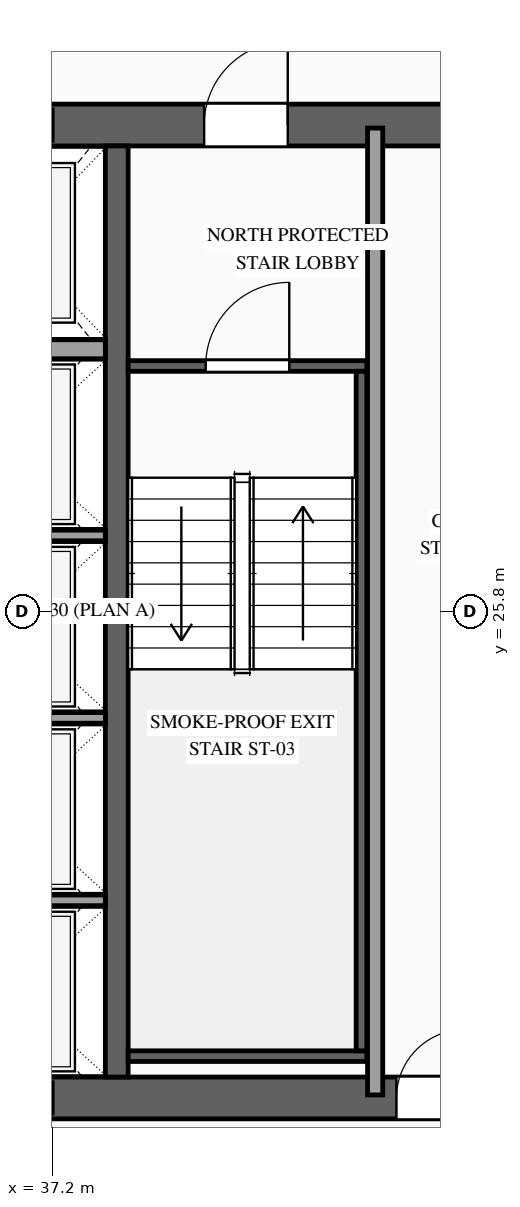
"""IFC4 building model, lengths in metres.
Left out: names, types, materials, properties, quantities, classifications, styles, units other than length and angle.
Written with IfcOpenShell. Run it as: python <this file> out.ifc"""

import sys

from ifc_helpers import new_model, si_unit, direction, frame, frame_2d, origin, place, context, subcontext, project, spatial, rectangle, extrude, source, transform, mapped, element, fill, save


model = new_model("IFC4")
c1 = context("Model", 3, precision=1e-05, world=origin(), true_north=direction((0.0, 1.0)))
c2 = subcontext(c1, "Body", "Model", "MODEL_VIEW")
j1 = project(units=[si_unit("LENGTHUNIT", "METRE"), si_unit("PLANEANGLEUNIT", "RADIAN")], contexts=[c1])
p1 = place(None, origin())
s1 = spatial("IfcSite", under=j1, at=p1, CompositionType="ELEMENT")
p2 = place(p1, origin())
s2 = spatial("IfcBuilding", under=s1, at=p2, CompositionType="ELEMENT")
p3 = place(p2, frame((0.0, 0.0, 252.1)))
s3 = spatial("IfcBuildingStorey", under=s2, at=p3, CompositionType="ELEMENT", Elevation=252.1)
p4 = place(p3, frame((23.525, 19.4, 0.0), z_axis=(0.0, 0.0, 1.0), x_axis=(1.0, 0.0, 0.0)))
e1 = element("IfcWall", 1, at=p4, inside=s3, PredefinedType="SHEAR", context=c2, shape_type="SweptSolid", body=[
    extrude(rectangle(XDim=26.95, YDim=0.55, at=frame_2d((13.475, 0.0))), origin(), (0.0, 0.0, 1.0), 3.5),
])
p5 = place(p4, frame((1.925, 0.0, 0.0)))
e2 = element("IfcOpeningElement", 2, at=p5, cuts=e1, PredefinedType="OPENING", context=c2, shape_type="SweptSolid", body=[
    extrude(rectangle(XDim=1.1, YDim=2.2, at=frame_2d((0.55, 1.1))), frame((0.0, 0.29, 0.0), z_axis=(0.0, -1.0, 0.0), x_axis=(1.0, 0.0, 0.0)), (0.0, 0.0, 1.0), 0.58),
])
p6 = place(p4, frame((9.825, 0.0, 0.0)))
e3 = element("IfcOpeningElement", 3, at=p6, cuts=e1, PredefinedType="OPENING", context=c2, shape_type="SweptSolid", body=[
    extrude(rectangle(XDim=1.1, YDim=2.2, at=frame_2d((0.55, 1.1))), frame((0.0, 0.29, 0.0), z_axis=(0.0, -1.0, 0.0), x_axis=(1.0, 0.0, 0.0)), (0.0, 0.0, 1.0), 0.58),
])
p7 = place(p4, frame((23.025, 0.0, 0.0)))
e4 = element("IfcOpeningElement", 4, at=p7, cuts=e1, PredefinedType="OPENING", context=c2, shape_type="SweptSolid", body=[
    extrude(rectangle(XDim=1.1, YDim=2.2, at=frame_2d((0.55, 1.1))), frame((0.0, 0.29, 0.0), z_axis=(0.0, -1.0, 0.0), x_axis=(1.0, 0.0, 0.0)), (0.0, 0.0, 1.0), 0.58),
])
p8 = place(p4, frame((19.645, 0.0, 0.0)))
e5 = element("IfcOpeningElement", 5, at=p8, cuts=e1, PredefinedType="OPENING", context=c2, shape_type="SweptSolid", body=[
    extrude(rectangle(XDim=0.9, YDim=2.15, at=frame_2d((0.45, 1.075))), frame((0.0, 0.29, 0.0), z_axis=(0.0, -1.0, 0.0), x_axis=(1.0, 0.0, 0.0)), (0.0, 0.0, 1.0), 0.58),
])
p9 = place(p4, frame((18.205, 0.0, 0.0)))
e6 = element("IfcOpeningElement", 6, at=p9, cuts=e1, PredefinedType="OPENING", context=c2, shape_type="SweptSolid", body=[
    extrude(rectangle(XDim=0.9, YDim=2.15, at=frame_2d((0.45, 1.075))), frame((0.0, 0.29, 0.0), z_axis=(0.0, -1.0, 0.0), x_axis=(1.0, 0.0, 0.0)), (0.0, 0.0, 1.0), 0.58),
])
p10 = place(p3, frame((23.525, 32.2, 0.0), z_axis=(0.0, 0.0, 1.0), x_axis=(1.0, 0.0, 0.0)))
e7 = element("IfcWall", 7, at=p10, inside=s3, PredefinedType="SHEAR", context=c2, shape_type="SweptSolid", body=[
    extrude(rectangle(XDim=26.95, YDim=0.55, at=frame_2d((13.475, 0.0))), origin(), (0.0, 0.0, 1.0), 3.5),
])
p11 = place(p10, frame((4.545, 0.0, 0.0)))
e8 = element("IfcOpeningElement", 8, at=p11, cuts=e7, PredefinedType="OPENING", context=c2, shape_type="SweptSolid", body=[
    extrude(rectangle(XDim=0.9, YDim=2.15, at=frame_2d((0.45, 1.075))), frame((0.0, 0.29, 0.0), z_axis=(0.0, -1.0, 0.0), x_axis=(1.0, 0.0, 0.0)), (0.0, 0.0, 1.0), 0.58),
])
p12 = place(p10, frame((9.825, 0.0, 0.0)))
e9 = element("IfcOpeningElement", 9, at=p12, cuts=e7, PredefinedType="OPENING", context=c2, shape_type="SweptSolid", body=[
    extrude(rectangle(XDim=1.1, YDim=2.2, at=frame_2d((0.55, 1.1))), frame((0.0, 0.29, 0.0), z_axis=(0.0, -1.0, 0.0), x_axis=(1.0, 0.0, 0.0)), (0.0, 0.0, 1.0), 0.58),
])
p13 = place(p10, frame((15.675, 0.0, 0.0)))
e10 = element("IfcOpeningElement", 10, at=p13, cuts=e7, PredefinedType="OPENING", context=c2, shape_type="SweptSolid", body=[
    extrude(rectangle(XDim=1.1, YDim=2.2, at=frame_2d((0.55, 1.1))), frame((0.0, 0.29, 0.0), z_axis=(0.0, -1.0, 0.0), x_axis=(1.0, 0.0, 0.0)), (0.0, 0.0, 1.0), 0.58),
])
m1 = source(origin(), c2, "Body", "SweptSolid", [
    extrude(rectangle(XDim=12.25, YDim=0.3, at=frame_2d((6.125, 0.0))), origin(), (0.0, 0.0, 1.0), 3.5),
])
p14 = place(p3, frame((38.05, 19.675, 0.0), z_axis=(0.0, 0.0, 1.0), x_axis=(0.0, 1.0, 0.0)))
e11 = element("IfcWall", 11, at=p14, inside=s3, PredefinedType="SOLIDWALL", context=c2, shape_type="MappedRepresentation", body=[
    mapped(m1, transform((0.0, 0.0, 0.0), scale=1.0)),
])
m2 = source(origin(), c2, "Body", "SweptSolid", [
    extrude(rectangle(XDim=2.4, YDim=0.14, at=frame_2d((1.2, 0.0))), origin(), (0.0, 0.0, 1.0), 3.28),
])
for number, where, z_axis, x_axis in (
    (12, (35.5, 22.0, 0.0), (0.0, 0.0, 1.0), (1.0, 0.0, 0.0)),
    (13, (35.5, 24.4, 0.0), (0.0, 0.0, 1.0), (1.0, 0.0, 0.0)),
    (14, (35.5, 26.8, 0.0), (0.0, 0.0, 1.0), (1.0, 0.0, 0.0)),
):
    element("IfcWall", number, at=place(p3, frame(where, z_axis=z_axis, x_axis=x_axis)), inside=s3, PredefinedType="SOLIDWALL", context=c2, shape_type="MappedRepresentation", body=[
        mapped(m2, transform((0.0, 0.0, 0.0), scale=1.0)),
    ])
m3 = source(origin(), c2, "Body", "SweptSolid", [
    extrude(rectangle(XDim=2.4, YDim=0.25, at=frame_2d((1.2, 0.0))), origin(), (0.0, 0.0, 1.0), 3.28),
])
p15 = place(p3, frame((35.5, 29.25, 0.0), z_axis=(0.0, 0.0, 1.0), x_axis=(1.0, 0.0, 0.0)))
e15 = element("IfcWall", 15, at=p15, inside=s3, PredefinedType="SOLIDWALL", context=c2, shape_type="MappedRepresentation", body=[
    mapped(m3, transform((0.0, 0.0, 0.0), scale=1.0)),
])
p16 = place(p3, frame((38.2, 29.03, 0.0), z_axis=(0.0, 0.0, 1.0), x_axis=(1.0, 0.0, 0.0)))
e16 = element("IfcWall", 16, at=p16, inside=s3, PredefinedType="SOLIDWALL", context=c2, shape_type="SweptSolid", body=[
    extrude(rectangle(XDim=3.14, YDim=0.14, at=frame_2d((1.57, 0.0))), origin(), (0.0, 0.0, 1.0), 3.28),
])
p17 = place(p16, frame((1.02, 0.0, 0.0)))
e17 = element("IfcOpeningElement", 17, at=p17, cuts=e16, PredefinedType="OPENING", context=c2, shape_type="SweptSolid", body=[
    extrude(rectangle(XDim=1.1, YDim=2.2, at=frame_2d((0.55, 1.1))), frame((0.0, 0.085, 0.0), z_axis=(0.0, -1.0, 0.0), x_axis=(1.0, 0.0, 0.0)), (0.0, 0.0, 1.0), 0.17),
])
m4 = source(origin(), c2, "Body", "SweptSolid", [
    extrude(rectangle(XDim=3.14, YDim=0.14, at=frame_2d((1.57, 0.0))), origin(), (0.0, 0.0, 1.0), 3.28),
])
p18 = place(p3, frame((38.2, 19.95, 0.0), z_axis=(0.0, 0.0, 1.0), x_axis=(1.0, 0.0, 0.0)))
e18 = element("IfcWall", 18, at=p18, inside=s3, PredefinedType="SOLIDWALL", context=c2, shape_type="MappedRepresentation", body=[
    mapped(m4, transform((0.0, 0.0, 0.0), scale=1.0)),
])
m5 = source(origin(), c2, "Body", "SweptSolid", [
    extrude(rectangle(XDim=8.94, YDim=0.14, at=frame_2d((4.47, 0.0))), origin(), (0.0, 0.0, 1.0), 3.28),
])
p19 = place(p3, frame((41.27, 20.02, 0.0), z_axis=(0.0, 0.0, 1.0), x_axis=(0.0, 1.0, 0.0)))
e19 = element("IfcWall", 19, at=p19, inside=s3, PredefinedType="SOLIDWALL", context=c2, shape_type="MappedRepresentation", body=[
    mapped(m5, transform((0.0, 0.0, 0.0), scale=1.0)),
])
m6 = source(origin(), c2, "Body", "SweptSolid", [
    extrude(rectangle(XDim=12.72, YDim=0.2, at=frame_2d((6.36, 0.0))), origin(), (0.0, 0.0, 1.0), 3.28),
])
p20 = place(p3, frame((41.45, 19.44, 0.0), z_axis=(0.0, 0.0, 1.0), x_axis=(0.0, 1.0, 0.0)))
e20 = element("IfcWall", 20, at=p20, inside=s3, PredefinedType="PARTITIONING", context=c2, shape_type="MappedRepresentation", body=[
    mapped(m6, transform((0.0, 0.0, 0.0), scale=1.0)),
])
m7 = source(origin(), c2, "Body", "SweptSolid", [
    extrude(rectangle(XDim=1.1, YDim=2.2, at=frame_2d((0.55, 1.1))), frame((0.0, 0.025, 0.0), z_axis=(0.0, -1.0, 0.0), x_axis=(1.0, 0.0, 0.0)), (0.0, 0.0, 1.0), 0.05),
])
p21 = place(p17, origin())
e21 = element("IfcDoor", 21, at=p21, inside=s3, OperationType="SINGLE_SWING_RIGHT", PredefinedType="DOOR", context=c2, shape_type="MappedRepresentation", body=[
    mapped(m7, transform((0.0, 0.0, 0.0), scale=1.0)),
])
fill(e17, e21)
p22 = place(p13, origin())
e22 = element("IfcDoor", 22, at=p22, inside=s3, OperationType="SINGLE_SWING_RIGHT", PredefinedType="DOOR", context=c2, shape_type="MappedRepresentation", body=[
    mapped(m7, transform((0.0, 0.0, 0.0), scale=1.0)),
])
fill(e10, e22)
m8 = source(origin(), c2, "Body", "SweptSolid", [
    extrude(rectangle(XDim=0.9, YDim=2.15, at=frame_2d((0.45, 1.075))), frame((0.0, 0.025, 0.0), z_axis=(0.0, -1.0, 0.0), x_axis=(1.0, 0.0, 0.0)), (0.0, 0.0, 1.0), 0.05),
])
p23 = place(p9, origin())
e23 = element("IfcDoor", 23, at=p23, inside=s3, OperationType="SINGLE_SWING_RIGHT", PredefinedType="DOOR", context=c2, shape_type="MappedRepresentation", body=[
    mapped(m8, transform((0.0, 0.0, 0.0), scale=1.0)),
])
fill(e6, e23)
save(model, sys.argv[1])
